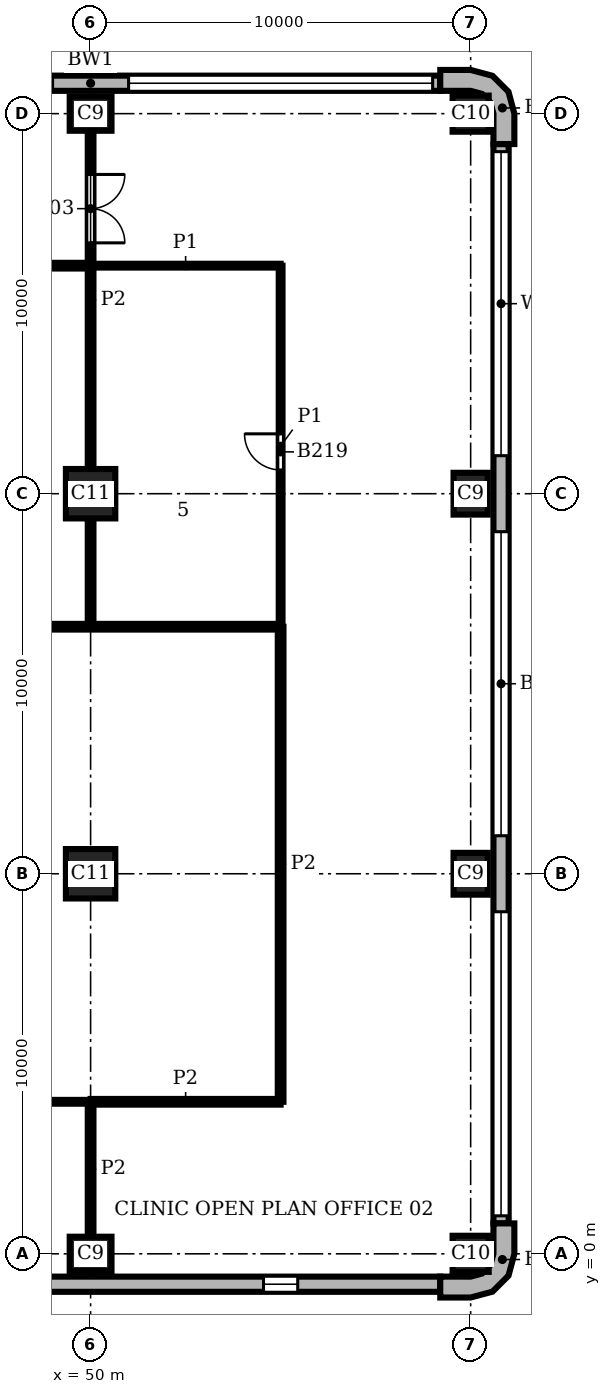
"""IFC4 building model, lengths in metres.
Left out: names, types, materials, properties, quantities, classifications, styles, units other than length and angle.
Written with IfcOpenShell. Run it as: python <this file> out.ifc"""

import sys

from ifc_helpers import new_model, si_unit, direction, frame, frame_2d, origin, origin_2d, place, context, subcontext, project, spatial, polyline, rectangle, outline, extrude, element, fill, save


model = new_model("IFC4")
c1 = context("Model", 3, precision=1e-05, world=origin(), true_north=direction((0.0, 1.0)))
c2 = subcontext(c1, "Body", "Model", "MODEL_VIEW")
j1 = project(units=[si_unit("LENGTHUNIT", "METRE"), si_unit("PLANEANGLEUNIT", "RADIAN")], contexts=[c1])
p1 = place(None, origin())
s1 = spatial("IfcSite", under=j1, at=p1, CompositionType="ELEMENT")
p2 = place(p1, origin())
s2 = spatial("IfcBuilding", under=s1, at=p2, CompositionType="ELEMENT")
p3 = place(p2, frame((0.0, 0.0, 143.4)))
s3 = spatial("IfcBuildingStorey", under=s2, at=p3, CompositionType="ELEMENT", Elevation=143.4)
p4 = place(p3, frame((50.0, 0.0, 0.0), z_axis=(0.0, 0.0, 1.0), x_axis=(1.0, 0.0, 0.0)))
e1 = element("IfcColumn", 1, at=p4, inside=s3, PredefinedType="COLUMN", context=c2, shape_type="SweptSolid", body=[
    extrude(rectangle(XDim=1.1, YDim=0.9, at=origin_2d()), origin(), (0.0, 0.0, 1.0), 3.9),
])
p5 = place(p3, frame((60.0, 0.0, 0.0), z_axis=(0.0, 0.0, 1.0), x_axis=(1.0, 0.0, 0.0)))
e2 = element("IfcColumn", 2, at=p5, inside=s3, PredefinedType="COLUMN", context=c2, shape_type="SweptSolid", body=[
    extrude(rectangle(XDim=0.95, YDim=0.95, at=origin_2d()), origin(), (0.0, 0.0, 1.0), 3.9),
])
for number, where, z_axis, x_axis in (
    (3, (60.0, 10.0, 0.0), (0.0, 0.0, 1.0), (0.0, 1.0, 0.0)),
    (4, (60.0, 20.0, 0.0), (0.0, 0.0, 1.0), (0.0, 1.0, 0.0)),
):
    element("IfcColumn", number, at=place(p3, frame(where, z_axis=z_axis, x_axis=x_axis)), inside=s3, PredefinedType="COLUMN", context=c2, shape_type="SweptSolid", body=[
        extrude(rectangle(XDim=1.1, YDim=0.9, at=origin_2d()), origin(), (0.0, 0.0, 1.0), 3.9),
    ])
p6 = place(p3, frame((60.0, 30.0, 0.0), z_axis=(0.0, 0.0, 1.0), x_axis=(1.0, 0.0, 0.0)))
e5 = element("IfcColumn", 5, at=p6, inside=s3, PredefinedType="COLUMN", context=c2, shape_type="SweptSolid", body=[
    extrude(rectangle(XDim=0.95, YDim=0.95, at=origin_2d()), origin(), (0.0, 0.0, 1.0), 3.9),
])
p7 = place(p3, frame((50.0, 30.0, 0.0), z_axis=(0.0, 0.0, 1.0), x_axis=(1.0, 0.0, 0.0)))
e6 = element("IfcColumn", 6, at=p7, inside=s3, PredefinedType="COLUMN", context=c2, shape_type="SweptSolid", body=[
    extrude(rectangle(XDim=1.1, YDim=0.9, at=origin_2d()), origin(), (0.0, 0.0, 1.0), 3.9),
])
for number, where, z_axis, x_axis in (
    (7, (50.0, 10.0, 0.0), (0.0, 0.0, 1.0), (1.0, 0.0, 0.0)),
    (8, (50.0, 20.0, 0.0), (0.0, 0.0, 1.0), (1.0, 0.0, 0.0)),
):
    element("IfcColumn", number, at=place(p3, frame(where, z_axis=z_axis, x_axis=x_axis)), inside=s3, PredefinedType="COLUMN", context=c2, shape_type="SweptSolid", body=[
        extrude(rectangle(XDim=1.3, YDim=1.3, at=origin_2d()), origin(), (0.0, 0.0, 1.0), 3.9),
    ])
p8 = place(p3, origin())
e9 = element("IfcWall", 9, at=p8, inside=s3, PredefinedType="SOLIDWALL", context=c2, shape_type="SweptSolid", body=[
    extrude(outline(polyline([(59.2, -1.0), (59.2, -1.15), (60.0, -1.15), (60.575, -0.996), (60.996, -0.575), (61.15, 0.0), (61.15, 0.8), (61.0, 0.8), (60.6, 0.8), (60.6, 0.0), (60.52, -0.3), (60.3, -0.52), (60.0, -0.6), (59.2, -0.6), (59.2, -1.0)])), origin(), (0.0, 0.0, 1.0), 3.9),
])
e10 = element("IfcWall", 10, at=p8, inside=s3, PredefinedType="SOLIDWALL", context=c2, shape_type="SweptSolid", body=[
    extrude(outline(polyline([(61.0, 29.2), (61.15, 29.2), (61.15, 30.0), (60.996, 30.575), (60.575, 30.996), (60.0, 31.15), (59.2, 31.15), (59.2, 31.0), (59.2, 30.6), (60.0, 30.6), (60.3, 30.52), (60.52, 30.3), (60.6, 30.0), (60.6, 29.2), (61.0, 29.2)])), origin(), (0.0, 0.0, 1.0), 3.9),
])
p9 = place(p3, frame((20.8, -0.8, 0.0), z_axis=(0.0, 0.0, 1.0), x_axis=(1.0, 0.0, 0.0)))
e11 = element("IfcWall", 11, at=p9, inside=s3, PredefinedType="SOLIDWALL", context=c2, shape_type="SweptSolid", body=[
    extrude(rectangle(XDim=38.4, YDim=0.4, at=frame_2d((19.2, 0.0))), origin(), (0.0, 0.0, 1.0), 3.9),
])
p10 = place(p9, frame((3.75, 0.0, 0.9)))
e12 = element("IfcOpeningElement", 12, at=p10, cuts=e11, PredefinedType="OPENING", context=c2, shape_type="SweptSolid", body=[
    extrude(rectangle(XDim=0.9, YDim=2.35, at=frame_2d((0.45, 1.175))), frame((0.0, 0.21, 0.0), z_axis=(0.0, -1.0, 0.0), x_axis=(1.0, 0.0, 0.0)), (0.0, 0.0, 1.0), 0.42),
])
p11 = place(p9, frame((13.75, 0.0, 0.9)))
e13 = element("IfcOpeningElement", 13, at=p11, cuts=e11, PredefinedType="OPENING", context=c2, shape_type="SweptSolid", body=[
    extrude(rectangle(XDim=0.9, YDim=2.35, at=frame_2d((0.45, 1.175))), frame((0.0, 0.21, 0.0), z_axis=(0.0, -1.0, 0.0), x_axis=(1.0, 0.0, 0.0)), (0.0, 0.0, 1.0), 0.42),
])
p12 = place(p9, frame((23.75, 0.0, 0.9)))
e14 = element("IfcOpeningElement", 14, at=p12, cuts=e11, PredefinedType="OPENING", context=c2, shape_type="SweptSolid", body=[
    extrude(rectangle(XDim=0.9, YDim=2.35, at=frame_2d((0.45, 1.175))), frame((0.0, 0.21, 0.0), z_axis=(0.0, -1.0, 0.0), x_axis=(1.0, 0.0, 0.0)), (0.0, 0.0, 1.0), 0.42),
])
p13 = place(p9, frame((33.75, 0.0, 0.9)))
e15 = element("IfcOpeningElement", 15, at=p13, cuts=e11, PredefinedType="OPENING", context=c2, shape_type="SweptSolid", body=[
    extrude(rectangle(XDim=0.9, YDim=2.35, at=frame_2d((0.45, 1.175))), frame((0.0, 0.21, 0.0), z_axis=(0.0, -1.0, 0.0), x_axis=(1.0, 0.0, 0.0)), (0.0, 0.0, 1.0), 0.42),
])
p14 = place(p3, frame((60.8, 0.8, 0.0), z_axis=(0.0, 0.0, 1.0), x_axis=(0.0, 1.0, 0.0)))
e16 = element("IfcWall", 16, at=p14, inside=s3, PredefinedType="SOLIDWALL", context=c2, shape_type="SweptSolid", body=[
    extrude(rectangle(XDim=28.4, YDim=0.4, at=frame_2d((14.2, 0.0))), origin(), (0.0, 0.0, 1.0), 3.9),
])
p15 = place(p14, frame((0.2, 0.0, 0.9)))
e17 = element("IfcOpeningElement", 17, at=p15, cuts=e16, PredefinedType="OPENING", context=c2, shape_type="SweptSolid", body=[
    extrude(rectangle(XDim=8.0, YDim=2.35, at=frame_2d((4.0, 1.175))), frame((0.0, 0.21, 0.0), z_axis=(0.0, -1.0, 0.0), x_axis=(1.0, 0.0, 0.0)), (0.0, 0.0, 1.0), 0.42),
])
p16 = place(p14, frame((10.2, 0.0, 0.9)))
e18 = element("IfcOpeningElement", 18, at=p16, cuts=e16, PredefinedType="OPENING", context=c2, shape_type="SweptSolid", body=[
    extrude(rectangle(XDim=8.0, YDim=2.35, at=frame_2d((4.0, 1.175))), frame((0.0, 0.21, 0.0), z_axis=(0.0, -1.0, 0.0), x_axis=(1.0, 0.0, 0.0)), (0.0, 0.0, 1.0), 0.42),
])
p17 = place(p14, frame((20.2, 0.0, 0.9)))
e19 = element("IfcOpeningElement", 19, at=p17, cuts=e16, PredefinedType="OPENING", context=c2, shape_type="SweptSolid", body=[
    extrude(rectangle(XDim=8.0, YDim=2.35, at=frame_2d((4.0, 1.175))), frame((0.0, 0.21, 0.0), z_axis=(0.0, -1.0, 0.0), x_axis=(1.0, 0.0, 0.0)), (0.0, 0.0, 1.0), 0.42),
])
p18 = place(p3, frame((59.2, 30.8, 0.0), z_axis=(0.0, 0.0, 1.0), x_axis=(-1.0, 0.0, 0.0)))
e20 = element("IfcWall", 20, at=p18, inside=s3, PredefinedType="SOLIDWALL", context=c2, shape_type="SweptSolid", body=[
    extrude(rectangle(XDim=18.4, YDim=0.4, at=frame_2d((9.2, 0.0))), origin(), (0.0, 0.0, 1.0), 3.9),
])
p19 = place(p18, frame((0.2, 0.0, 0.9)))
e21 = element("IfcOpeningElement", 21, at=p19, cuts=e20, PredefinedType="OPENING", context=c2, shape_type="SweptSolid", body=[
    extrude(rectangle(XDim=8.0, YDim=2.35, at=frame_2d((4.0, 1.175))), frame((0.0, 0.21, 0.0), z_axis=(0.0, -1.0, 0.0), x_axis=(1.0, 0.0, 0.0)), (0.0, 0.0, 1.0), 0.42),
])
p20 = place(p18, frame((10.2, 0.0, 0.9)))
e22 = element("IfcOpeningElement", 22, at=p20, cuts=e20, PredefinedType="OPENING", context=c2, shape_type="SweptSolid", body=[
    extrude(rectangle(XDim=8.0, YDim=2.35, at=frame_2d((4.0, 1.175))), frame((0.0, 0.21, 0.0), z_axis=(0.0, -1.0, 0.0), x_axis=(1.0, 0.0, 0.0)), (0.0, 0.0, 1.0), 0.42),
])
p21 = place(p3, frame((55.0, 16.5, 0.0), z_axis=(0.0, 0.0, 1.0), x_axis=(0.0, 1.0, 0.0)))
e23 = element("IfcWall", 23, at=p21, inside=s3, PredefinedType="PARTITIONING", context=c2, shape_type="SweptSolid", body=[
    extrude(rectangle(XDim=9.5, YDim=0.1, at=frame_2d((4.75, 0.0))), origin(), (0.0, 0.0, 1.0), 3.58),
])
p22 = place(p21, frame((4.125, 0.0, 0.0)))
e24 = element("IfcOpeningElement", 24, at=p22, cuts=e23, PredefinedType="OPENING", context=c2, shape_type="SweptSolid", body=[
    extrude(rectangle(XDim=0.95, YDim=2.1, at=frame_2d((0.475, 1.05))), frame((0.0, 0.06, 0.0), z_axis=(0.0, -1.0, 0.0), x_axis=(1.0, 0.0, 0.0)), (0.0, 0.0, 1.0), 0.12),
])
p23 = place(p3, frame((40.0, 4.0, 0.0), z_axis=(0.0, 0.0, 1.0), x_axis=(1.0, 0.0, 0.0)))
e25 = element("IfcWall", 25, at=p23, inside=s3, PredefinedType="PARTITIONING", context=c2, shape_type="SweptSolid", body=[
    extrude(rectangle(XDim=10.0, YDim=0.1, at=frame_2d((5.0, 0.0))), origin(), (0.0, 0.0, 1.0), 3.58),
])
p24 = place(p23, frame((5.325, 0.0, 0.0)))
e26 = element("IfcOpeningElement", 26, at=p24, cuts=e25, PredefinedType="OPENING", context=c2, shape_type="SweptSolid", body=[
    extrude(rectangle(XDim=0.95, YDim=2.1, at=frame_2d((0.475, 1.05))), frame((0.0, 0.06, 0.0), z_axis=(0.0, -1.0, 0.0), x_axis=(1.0, 0.0, 0.0)), (0.0, 0.0, 1.0), 0.12),
])
p25 = place(p3, frame((50.0, 26.0, 0.0), z_axis=(0.0, 0.0, 1.0), x_axis=(1.0, 0.0, 0.0)))
e27 = element("IfcWall", 27, at=p25, inside=s3, PredefinedType="PARTITIONING", context=c2, shape_type="SweptSolid", body=[
    extrude(rectangle(XDim=5.0, YDim=0.1, at=frame_2d((2.5, 0.0))), origin(), (0.0, 0.0, 1.0), 3.58),
])
p26 = place(p3, frame((50.0, 0.45, 0.0), z_axis=(0.0, 0.0, 1.0), x_axis=(0.0, 1.0, 0.0)))
e28 = element("IfcWall", 28, at=p26, inside=s3, PredefinedType="PARTITIONING", context=c2, shape_type="SweptSolid", body=[
    extrude(rectangle(XDim=3.55, YDim=0.15, at=frame_2d((1.775, 0.0))), origin(), (0.0, 0.0, 1.0), 3.58),
])
p27 = place(p3, frame((50.0, 16.5, 0.0), z_axis=(0.0, 0.0, 1.0), x_axis=(0.0, 1.0, 0.0)))
e29 = element("IfcWall", 29, at=p27, inside=s3, PredefinedType="PARTITIONING", context=c2, shape_type="SweptSolid", body=[
    extrude(rectangle(XDim=2.85, YDim=0.15, at=frame_2d((1.425, 0.0))), origin(), (0.0, 0.0, 1.0), 3.58),
])
p28 = place(p3, frame((50.0, 20.65, 0.0), z_axis=(0.0, 0.0, 1.0), x_axis=(0.0, 1.0, 0.0)))
e30 = element("IfcWall", 30, at=p28, inside=s3, PredefinedType="PARTITIONING", context=c2, shape_type="SweptSolid", body=[
    extrude(rectangle(XDim=8.9, YDim=0.15, at=frame_2d((4.45, 0.0))), origin(), (0.0, 0.0, 1.0), 3.58),
])
p29 = place(p28, frame((5.95, 0.0, 0.0)))
e31 = element("IfcOpeningElement", 31, at=p29, cuts=e30, PredefinedType="OPENING", context=c2, shape_type="SweptSolid", body=[
    extrude(rectangle(XDim=1.8, YDim=2.1, at=frame_2d((0.9, 1.05))), frame((0.0, 0.085, 0.0), z_axis=(0.0, -1.0, 0.0), x_axis=(1.0, 0.0, 0.0)), (0.0, 0.0, 1.0), 0.17),
])
p30 = place(p3, frame((55.0, 4.0, 0.0), z_axis=(0.0, 0.0, 1.0), x_axis=(0.0, 1.0, 0.0)))
e32 = element("IfcWall", 32, at=p30, inside=s3, PredefinedType="PARTITIONING", context=c2, shape_type="SweptSolid", body=[
    extrude(rectangle(XDim=12.5, YDim=0.15, at=frame_2d((6.25, 0.0))), origin(), (0.0, 0.0, 1.0), 3.58),
])
p31 = place(p3, frame((50.0, 4.0, 0.0), z_axis=(0.0, 0.0, 1.0), x_axis=(1.0, 0.0, 0.0)))
e33 = element("IfcWall", 33, at=p31, inside=s3, PredefinedType="PARTITIONING", context=c2, shape_type="SweptSolid", body=[
    extrude(rectangle(XDim=5.0, YDim=0.15, at=frame_2d((2.5, 0.0))), origin(), (0.0, 0.0, 1.0), 3.58),
])
p32 = place(p3, frame((35.002, 16.5, 0.0), z_axis=(0.0, 0.0, 1.0), x_axis=(1.0, 0.0, 0.0)))
e34 = element("IfcWall", 34, at=p32, inside=s3, PredefinedType="PARTITIONING", context=c2, shape_type="SweptSolid", body=[
    extrude(rectangle(XDim=19.998, YDim=0.15, at=frame_2d((9.999, 0.0))), origin(), (0.0, 0.0, 1.0), 3.58),
])
p33 = place(p3, frame((33.201, 26.0, 0.0), z_axis=(0.0, 0.0, 1.0), x_axis=(1.0, 0.0, 0.0)))
e35 = element("IfcWall", 35, at=p33, inside=s3, PredefinedType="PARTITIONING", context=c2, shape_type="SweptSolid", body=[
    extrude(rectangle(XDim=16.799, YDim=0.15, at=frame_2d((8.399, 0.0))), origin(), (0.0, 0.0, 1.0), 3.58),
])
p34 = place(p33, frame((12.398, 0.0, 0.0)))
e36 = element("IfcOpeningElement", 36, at=p34, cuts=e35, PredefinedType="OPENING", context=c2, shape_type="SweptSolid", body=[
    extrude(rectangle(XDim=1.0, YDim=2.1, at=frame_2d((0.5, 1.05))), frame((0.0, 0.085, 0.0), z_axis=(0.0, -1.0, 0.0), x_axis=(1.0, 0.0, 0.0)), (0.0, 0.0, 1.0), 0.17),
])
p35 = place(p13, origin())
e37 = element("IfcWindow", 37, at=p35, inside=s3, PartitioningType="SINGLE_PANEL", PredefinedType="WINDOW", context=c2, shape_type="SweptSolid", body=[
    extrude(rectangle(XDim=0.9, YDim=2.35, at=frame_2d((0.45, 1.175))), frame((0.0, 0.16, 0.0), z_axis=(0.0, -1.0, 0.0), x_axis=(1.0, 0.0, 0.0)), (0.0, 0.0, 1.0), 0.06),
])
fill(e15, e37)
p36 = place(p15, origin())
e38 = element("IfcWindow", 38, at=p36, inside=s3, PartitioningType="SINGLE_PANEL", PredefinedType="WINDOW", context=c2, shape_type="SweptSolid", body=[
    extrude(rectangle(XDim=8.0, YDim=2.35, at=frame_2d((4.0, 1.175))), frame((0.0, 0.16, 0.0), z_axis=(0.0, -1.0, 0.0), x_axis=(1.0, 0.0, 0.0)), (0.0, 0.0, 1.0), 0.06),
])
fill(e17, e38)
p37 = place(p16, origin())
e39 = element("IfcWindow", 39, at=p37, inside=s3, PartitioningType="SINGLE_PANEL", PredefinedType="WINDOW", context=c2, shape_type="SweptSolid", body=[
    extrude(rectangle(XDim=8.0, YDim=2.35, at=frame_2d((4.0, 1.175))), frame((0.0, 0.16, 0.0), z_axis=(0.0, -1.0, 0.0), x_axis=(1.0, 0.0, 0.0)), (0.0, 0.0, 1.0), 0.06),
])
fill(e18, e39)
p38 = place(p17, origin())
e40 = element("IfcWindow", 40, at=p38, inside=s3, PartitioningType="SINGLE_PANEL", PredefinedType="WINDOW", context=c2, shape_type="SweptSolid", body=[
    extrude(rectangle(XDim=8.0, YDim=2.35, at=frame_2d((4.0, 1.175))), frame((0.0, 0.16, 0.0), z_axis=(0.0, -1.0, 0.0), x_axis=(1.0, 0.0, 0.0)), (0.0, 0.0, 1.0), 0.06),
])
fill(e19, e40)
p39 = place(p19, origin())
e41 = element("IfcWindow", 41, at=p39, inside=s3, PartitioningType="SINGLE_PANEL", PredefinedType="WINDOW", context=c2, shape_type="SweptSolid", body=[
    extrude(rectangle(XDim=8.0, YDim=2.35, at=frame_2d((4.0, 1.175))), frame((0.0, 0.16, 0.0), z_axis=(0.0, -1.0, 0.0), x_axis=(1.0, 0.0, 0.0)), (0.0, 0.0, 1.0), 0.06),
])
fill(e21, e41)
p40 = place(p29, frame((1.8, 0.0, 0.0), z_axis=(0.0, 0.0, 1.0), x_axis=(-1.0, 0.0, 0.0)))
e42 = element("IfcDoor", 42, at=p40, inside=s3, OperationType="DOUBLE_DOOR_SINGLE_SWING", PredefinedType="DOOR", context=c2, shape_type="SweptSolid", body=[
    extrude(rectangle(XDim=1.8, YDim=2.1, at=frame_2d((0.9, 1.05))), frame((0.0, 0.025, 0.0), z_axis=(0.0, -1.0, 0.0), x_axis=(1.0, 0.0, 0.0)), (0.0, 0.0, 1.0), 0.05),
])
fill(e31, e42)
p41 = place(p22, origin())
e43 = element("IfcDoor", 43, at=p41, inside=s3, OperationType="SINGLE_SWING_RIGHT", PredefinedType="DOOR", context=c2, shape_type="SweptSolid", body=[
    extrude(rectangle(XDim=0.95, YDim=2.1, at=frame_2d((0.475, 1.05))), frame((0.0, 0.025, 0.0), z_axis=(0.0, -1.0, 0.0), x_axis=(1.0, 0.0, 0.0)), (0.0, 0.0, 1.0), 0.05),
])
fill(e24, e43)
save(model, sys.argv[1])
